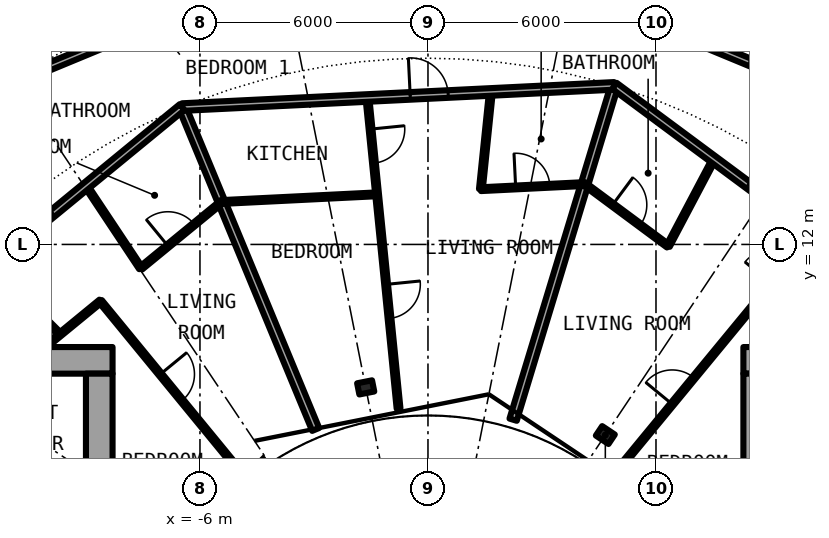
"""IFC4 building model, lengths in metres.
Left out: names, types, materials, properties, quantities, classifications, styles, units other than length and angle.
Written with IfcOpenShell. Run it as: python <this file> out.ifc"""

import sys

from ifc_helpers import new_model, si_unit, direction, frame, frame_2d, origin, origin_2d, place, context, subcontext, project, spatial, rectangle, i_section, extrude, element, fill, save


model = new_model("IFC4")
c1 = context("Model", 3, precision=1e-05, world=origin(), true_north=direction((0.0, 1.0)))
c2 = subcontext(c1, "Body", "Model", "MODEL_VIEW")
j1 = project(units=[si_unit("LENGTHUNIT", "METRE"), si_unit("PLANEANGLEUNIT", "RADIAN")], contexts=[c1])
p1 = place(None, origin())
s1 = spatial("IfcSite", under=j1, at=p1, CompositionType="ELEMENT")
p2 = place(p1, origin())
s2 = spatial("IfcBuilding", under=s1, at=p2, CompositionType="ELEMENT")
p3 = place(p2, frame((0.0, 0.0, 69.7)))
s3 = spatial("IfcBuildingStorey", under=s2, at=p3, CompositionType="ELEMENT", Elevation=69.7)
for number, where, z_axis, x_axis in (
    (1, (4.667, 6.984, 0.0), (0.0, 0.0, 1.0), (0.556, 0.831, 0.0)),
    (2, (-1.639, 8.239, 0.0), (0.0, 0.0, 1.0), (-0.195, 0.981, 0.0)),
):
    element("IfcColumn", number, at=place(p3, frame(where, z_axis=z_axis, x_axis=x_axis)), inside=s3, PredefinedType="COLUMN", context=c2, shape_type="SweptSolid", body=[
        extrude(i_section(OverallWidth=0.3, OverallDepth=0.4, WebThickness=0.013, FlangeThickness=0.024, FilletRadius=0.027, at=origin_2d()), origin(), (0.0, 0.0, 1.0), 3.05),
    ])
p4 = place(p3, frame((22.3, 8.95, 0.0), z_axis=(0.0, 0.0, 1.0), x_axis=(-1.0, 0.0, 0.0)))
e3 = element("IfcWall", 3, at=p4, inside=s3, PredefinedType="SHEAR", context=c2, shape_type="SweptSolid", body=[
    extrude(rectangle(XDim=14.0, YDim=0.7, at=frame_2d((7.0, 0.0))), origin(), (0.0, 0.0, 1.0), 3.05),
])
p5 = place(p4, frame((1.225, 0.0, 0.0)))
e4 = element("IfcOpeningElement", 4, at=p5, cuts=e3, PredefinedType="OPENING", context=c2, shape_type="SweptSolid", body=[
    extrude(rectangle(XDim=1.2, YDim=2.3, at=frame_2d((0.6, 1.15))), frame((0.0, 0.36, 0.0), z_axis=(0.0, -1.0, 0.0), x_axis=(1.0, 0.0, 0.0)), (0.0, 0.0, 1.0), 0.72),
])
p6 = place(p3, frame((8.65, -8.6, 0.0), z_axis=(0.0, 0.0, 1.0), x_axis=(0.0, 1.0, 0.0)))
e5 = element("IfcWall", 5, at=p6, inside=s3, PredefinedType="SHEAR", context=c2, shape_type="SweptSolid", body=[
    extrude(rectangle(XDim=17.2, YDim=0.7, at=frame_2d((8.6, 0.0))), origin(), (0.0, 0.0, 1.0), 3.05),
])
p7 = place(p6, frame((7.4, 0.0, 0.1)))
e6 = element("IfcOpeningElement", 6, at=p7, cuts=e5, PredefinedType="OPENING", context=c2, shape_type="SweptSolid", body=[
    extrude(rectangle(XDim=2.4, YDim=2.2, at=frame_2d((1.2, 1.1))), frame((0.0, 0.36, 0.0), z_axis=(0.0, -1.0, 0.0), x_axis=(1.0, 0.0, 0.0)), (0.0, 0.0, 1.0), 0.72),
])
p8 = place(p3, frame((-8.3, 8.95, 0.0), z_axis=(0.0, 0.0, 1.0), x_axis=(-1.0, 0.0, 0.0)))
e7 = element("IfcWall", 7, at=p8, inside=s3, PredefinedType="SHEAR", context=c2, shape_type="SweptSolid", body=[
    extrude(rectangle(XDim=14.0, YDim=0.7, at=frame_2d((7.0, 0.0))), origin(), (0.0, 0.0, 1.0), 3.05),
])
p9 = place(p8, frame((11.575, 0.0, 0.0)))
e8 = element("IfcOpeningElement", 8, at=p9, cuts=e7, PredefinedType="OPENING", context=c2, shape_type="SweptSolid", body=[
    extrude(rectangle(XDim=1.2, YDim=2.3, at=frame_2d((0.6, 1.15))), frame((0.0, 0.36, 0.0), z_axis=(0.0, -1.0, 0.0), x_axis=(1.0, 0.0, 0.0)), (0.0, 0.0, 1.0), 0.72),
])
p10 = place(p3, frame((-8.65, 8.6, 0.0), z_axis=(0.0, 0.0, 1.0), x_axis=(0.0, -1.0, 0.0)))
e9 = element("IfcWall", 9, at=p10, inside=s3, PredefinedType="SHEAR", context=c2, shape_type="SweptSolid", body=[
    extrude(rectangle(XDim=17.2, YDim=0.7, at=frame_2d((8.6, 0.0))), origin(), (0.0, 0.0, 1.0), 3.05),
])
p11 = place(p10, frame((7.4, 0.0, 0.1)))
e10 = element("IfcOpeningElement", 10, at=p11, cuts=e9, PredefinedType="OPENING", context=c2, shape_type="SweptSolid", body=[
    extrude(rectangle(XDim=2.4, YDim=2.2, at=frame_2d((1.2, 1.1))), frame((0.0, 0.36, 0.0), z_axis=(0.0, -1.0, 0.0), x_axis=(1.0, 0.0, 0.0)), (0.0, 0.0, 1.0), 0.72),
])
p12 = place(p3, frame((-11.524, 11.464, 0.0), z_axis=(0.0, 0.0, 1.0), x_axis=(0.708796844581, -0.705412668665, 0.0)))
e11 = element("IfcWall", 11, at=p12, inside=s3, PredefinedType="PARTITIONING", context=c2, shape_type="SweptSolid", body=[
    extrude(rectangle(XDim=2.597, YDim=0.1, at=frame_2d((1.299, 0.0))), origin(), (0.0, 0.0, 1.0), 2.7),
])
p13 = place(p12, frame((0.849, 0.0, 0.0)))
e12 = element("IfcOpeningElement", 12, at=p13, cuts=e11, PredefinedType="OPENING", context=c2, shape_type="SweptSolid", body=[
    extrude(rectangle(XDim=0.9, YDim=2.3, at=frame_2d((0.45, 1.15))), frame((0.0, 0.06, 0.0), z_axis=(0.0, -1.0, 0.0), x_axis=(1.0, 0.0, 0.0)), (0.0, 0.0, 1.0), 0.12),
])
p14 = place(p3, frame((-8.996, 13.539, 0.0), z_axis=(0.0, 0.0, 1.0), x_axis=(0.553615197403, -0.83277260594, 0.0)))
e13 = element("IfcWall", 13, at=p14, inside=s3, PredefinedType="PARTITIONING", context=c2, shape_type="SweptSolid", body=[
    extrude(rectangle(XDim=2.597, YDim=0.1, at=frame_2d((1.299, 0.0))), origin(), (0.0, 0.0, 1.0), 2.7),
])
p15 = place(p3, frame((-8.62, 10.504, 0.0), z_axis=(0.0, 0.0, 1.0), x_axis=(0.634358693064, -0.773038840249, 0.0)))
e14 = element("IfcWall", 14, at=p15, inside=s3, PredefinedType="PARTITIONING", context=c2, shape_type="SweptSolid", body=[
    extrude(rectangle(XDim=5.868, YDim=0.1, at=frame_2d((2.934, 0.0))), origin(), (0.0, 0.0, 1.0), 2.7),
])
p16 = place(p15, frame((2.484, 0.0, 0.0)))
e15 = element("IfcOpeningElement", 15, at=p16, cuts=e14, PredefinedType="OPENING", context=c2, shape_type="SweptSolid", body=[
    extrude(rectangle(XDim=0.9, YDim=2.3, at=frame_2d((0.45, 1.15))), frame((0.0, 0.06, 0.0), z_axis=(0.0, -1.0, 0.0), x_axis=(1.0, 0.0, 0.0)), (0.0, 0.0, 1.0), 0.12),
])
p17 = place(p3, frame((-6.468, 15.614, 0.0), z_axis=(0.0, 0.0, 1.0), x_axis=(0.382646942224, -0.923894646378, 0.0)))
e16 = element("IfcWall", 16, at=p17, inside=s3, PredefinedType="PARTITIONING", context=c2, shape_type="SweptSolid", body=[
    extrude(rectangle(XDim=9.181, YDim=0.2, at=frame_2d((4.59, 0.0))), origin(), (0.0, 0.0, 1.0), 2.7),
])
p18 = place(p3, frame((-1.593, 15.853, 0.0), z_axis=(0.0, 0.0, 1.0), x_axis=(0.099730339513, -0.995014502096, 0.0)))
e17 = element("IfcWall", 17, at=p18, inside=s3, PredefinedType="PARTITIONING", context=c2, shape_type="SweptSolid", body=[
    extrude(rectangle(XDim=8.213, YDim=0.1, at=frame_2d((4.106, 0.0))), origin(), (0.0, 0.0, 1.0), 2.7),
])
p19 = place(p18, frame((0.823, 0.0, 0.0)))
e18 = element("IfcOpeningElement", 18, at=p19, cuts=e17, PredefinedType="OPENING", context=c2, shape_type="SweptSolid", body=[
    extrude(rectangle(XDim=0.9, YDim=2.3, at=frame_2d((0.45, 1.15))), frame((0.0, 0.06, 0.0), z_axis=(0.0, -1.0, 0.0), x_axis=(1.0, 0.0, 0.0)), (0.0, 0.0, 1.0), 0.12),
])
p20 = place(p18, frame((4.929, 0.0, 0.0)))
e19 = element("IfcOpeningElement", 19, at=p20, cuts=e17, PredefinedType="OPENING", context=c2, shape_type="SweptSolid", body=[
    extrude(rectangle(XDim=0.9, YDim=2.3, at=frame_2d((0.45, 1.15))), frame((0.0, 0.06, 0.0), z_axis=(0.0, -1.0, 0.0), x_axis=(1.0, 0.0, 0.0)), (0.0, 0.0, 1.0), 0.12),
])
p21 = place(p3, frame((1.392, 13.454, 0.0), z_axis=(0.0, 0.0, 1.0), x_axis=(0.102594773028, 0.994723234145, 0.0)))
e20 = element("IfcWall", 20, at=p21, inside=s3, PredefinedType="PARTITIONING", context=c2, shape_type="SweptSolid", body=[
    extrude(rectangle(XDim=2.573, YDim=0.1, at=frame_2d((1.286, 0.0))), origin(), (0.0, 0.0, 1.0), 2.7),
])
p22 = place(p3, frame((2.241, 7.388, 0.0), z_axis=(0.0, 0.0, 1.0), x_axis=(0.290323311932, 0.956928615179, 0.0)))
e21 = element("IfcWall", 21, at=p22, inside=s3, PredefinedType="PARTITIONING", context=c2, shape_type="SweptSolid", body=[
    extrude(rectangle(XDim=9.179, YDim=0.2, at=frame_2d((4.59, 0.0))), origin(), (0.0, 0.0, 1.0), 2.7),
])
p23 = place(p3, frame((4.909, 5.958, 0.0), z_axis=(0.0, 0.0, 1.0), x_axis=(0.635976043025, 0.771708800454, 0.0)))
e22 = element("IfcWall", 22, at=p23, inside=s3, PredefinedType="PARTITIONING", context=c2, shape_type="SweptSolid", body=[
    extrude(rectangle(XDim=8.213, YDim=0.1, at=frame_2d((4.106, 0.0))), origin(), (0.0, 0.0, 1.0), 2.7),
])
p24 = place(p23, frame((6.49, 0.0, 0.0)))
e23 = element("IfcOpeningElement", 23, at=p24, cuts=e22, PredefinedType="OPENING", context=c2, shape_type="SweptSolid", body=[
    extrude(rectangle(XDim=0.9, YDim=2.3, at=frame_2d((0.45, 1.15))), frame((0.0, 0.06, 0.0), z_axis=(0.0, -1.0, 0.0), x_axis=(1.0, 0.0, 0.0)), (0.0, 0.0, 1.0), 0.12),
])
p25 = place(p23, frame((2.384, 0.0, 0.0)))
e24 = element("IfcOpeningElement", 24, at=p25, cuts=e22, PredefinedType="OPENING", context=c2, shape_type="SweptSolid", body=[
    extrude(rectangle(XDim=0.9, YDim=2.3, at=frame_2d((0.45, 1.15))), frame((0.0, 0.06, 0.0), z_axis=(0.0, -1.0, 0.0), x_axis=(1.0, 0.0, 0.0)), (0.0, 0.0, 1.0), 0.12),
])
p26 = place(p3, frame((6.318, 11.96, 0.0), z_axis=(0.0, 0.0, 1.0), x_axis=(0.467001992543, 0.884256263173, 0.0)))
e25 = element("IfcWall", 25, at=p26, inside=s3, PredefinedType="PARTITIONING", context=c2, shape_type="SweptSolid", body=[
    extrude(rectangle(XDim=2.572, YDim=0.1, at=frame_2d((1.286, 0.0))), origin(), (0.0, 0.0, 1.0), 2.7),
])
p27 = place(p3, frame((-5.439, 13.116, 0.0), z_axis=(0.0, 0.0, 1.0), x_axis=(0.998772010578, 0.049542616872, 0.0)))
e26 = element("IfcWall", 26, at=p27, inside=s3, PredefinedType="PARTITIONING", context=c2, shape_type="SweptSolid", body=[
    extrude(rectangle(XDim=4.1, YDim=0.1, at=frame_2d((2.05, 0.0))), origin(), (0.0, 0.0, 1.0), 2.7),
])
p28 = place(p3, frame((1.392, 13.454, 0.0), z_axis=(0.0, 0.0, 1.0), x_axis=(0.998779365748, 0.049394114582, 0.0)))
e27 = element("IfcWall", 27, at=p28, inside=s3, PredefinedType="PARTITIONING", context=c2, shape_type="SweptSolid", body=[
    extrude(rectangle(XDim=2.733, YDim=0.1, at=frame_2d((1.367, 0.0))), origin(), (0.0, 0.0, 1.0), 2.7),
])
p29 = place(p28, frame((0.917, 0.0, 0.0)))
e28 = element("IfcOpeningElement", 28, at=p29, cuts=e27, PredefinedType="OPENING", context=c2, shape_type="SweptSolid", body=[
    extrude(rectangle(XDim=0.9, YDim=2.3, at=frame_2d((0.45, 1.15))), frame((0.0, 0.06, 0.0), z_axis=(0.0, -1.0, 0.0), x_axis=(1.0, 0.0, 0.0)), (0.0, 0.0, 1.0), 0.12),
])
p30 = place(p3, frame((4.122, 13.589, 0.0), z_axis=(0.0, 0.0, 1.0), x_axis=(0.803128348509, -0.595806055542, 0.0)))
e29 = element("IfcWall", 29, at=p30, inside=s3, PredefinedType="PARTITIONING", context=c2, shape_type="SweptSolid", body=[
    extrude(rectangle(XDim=2.734, YDim=0.1, at=frame_2d((1.367, 0.0))), origin(), (0.0, 0.0, 1.0), 2.7),
])
p31 = place(p30, frame((0.917, 0.0, 0.0)))
e30 = element("IfcOpeningElement", 30, at=p31, cuts=e29, PredefinedType="OPENING", context=c2, shape_type="SweptSolid", body=[
    extrude(rectangle(XDim=0.9, YDim=2.3, at=frame_2d((0.45, 1.15))), frame((0.0, 0.06, 0.0), z_axis=(0.0, -1.0, 0.0), x_axis=(1.0, 0.0, 0.0)), (0.0, 0.0, 1.0), 0.12),
])
p32 = place(p3, frame((-10.087, 9.3, 0.0), z_axis=(0.0, 0.0, 1.0), x_axis=(0.772957368531, 0.6344579627, 0.0)))
e31 = element("IfcWall", 31, at=p32, inside=s3, PredefinedType="PARTITIONING", context=c2, shape_type="SweptSolid", body=[
    extrude(rectangle(XDim=1.906, YDim=0.1, at=frame_2d((0.953, 0.0))), origin(), (0.0, 0.0, 1.0), 2.7),
])
p33 = place(p3, frame((-7.552, 11.379, 0.0), z_axis=(0.0, 0.0, 1.0), x_axis=(0.773323547924, 0.634011585246, 0.0)))
e32 = element("IfcWall", 32, at=p33, inside=s3, PredefinedType="PARTITIONING", context=c2, shape_type="SweptSolid", body=[
    extrude(rectangle(XDim=2.748, YDim=0.1, at=frame_2d((1.374, 0.0))), origin(), (0.0, 0.0, 1.0), 2.7),
])
p34 = place(p33, frame((0.917, 0.0, 0.0)))
e33 = element("IfcOpeningElement", 33, at=p34, cuts=e32, PredefinedType="OPENING", context=c2, shape_type="SweptSolid", body=[
    extrude(rectangle(XDim=0.9, YDim=2.3, at=frame_2d((0.45, 1.15))), frame((0.0, 0.06, 0.0), z_axis=(0.0, -1.0, 0.0), x_axis=(1.0, 0.0, 0.0)), (0.0, 0.0, 1.0), 0.12),
])
p35 = place(p3, frame((-6.468, 15.614, 0.0), z_axis=(0.0, 0.0, 1.0), x_axis=(0.998797695979, 0.049022061427, 0.0)))
e34 = element("IfcWall", 34, at=p35, inside=s3, PredefinedType="PARTITIONING", context=c2, shape_type="SweptSolid", body=[
    extrude(rectangle(XDim=11.385, YDim=0.2, at=frame_2d((5.692, 0.0))), origin(), (0.0, 0.0, 1.0), 2.7),
])
p36 = place(p35, frame((6.008, 0.0, 0.0)))
e35 = element("IfcOpeningElement", 35, at=p36, cuts=e34, PredefinedType="OPENING", context=c2, shape_type="SweptSolid", body=[
    extrude(rectangle(XDim=1.0, YDim=2.3, at=frame_2d((0.5, 1.15))), frame((0.0, 0.11, 0.0), z_axis=(0.0, -1.0, 0.0), x_axis=(1.0, 0.0, 0.0)), (0.0, 0.0, 1.0), 0.22),
])
p37 = place(p3, frame((4.906, 16.172, 0.0), z_axis=(0.0, 0.0, 1.0), x_axis=(0.803204584823, -0.59570327758, 0.0)))
e36 = element("IfcWall", 36, at=p37, inside=s3, PredefinedType="PARTITIONING", context=c2, shape_type="SweptSolid", body=[
    extrude(rectangle(XDim=11.387, YDim=0.2, at=frame_2d((5.693, 0.0))), origin(), (0.0, 0.0, 1.0), 2.7),
])
p38 = place(p37, frame((4.38, 0.0, 0.0)))
e37 = element("IfcOpeningElement", 37, at=p38, cuts=e36, PredefinedType="OPENING", context=c2, shape_type="SweptSolid", body=[
    extrude(rectangle(XDim=1.0, YDim=2.3, at=frame_2d((0.5, 1.15))), frame((0.0, 0.11, 0.0), z_axis=(0.0, -1.0, 0.0), x_axis=(1.0, 0.0, 0.0)), (0.0, 0.0, 1.0), 0.22),
])
p39 = place(p3, frame((-14.052, 9.389, 0.0), z_axis=(0.0, 0.0, 1.0), x_axis=(0.77292501819, 0.634497372931, 0.0)))
e38 = element("IfcWall", 38, at=p39, inside=s3, PredefinedType="PARTITIONING", context=c2, shape_type="SweptSolid", body=[
    extrude(rectangle(XDim=9.81, YDim=0.2, at=frame_2d((4.905, 0.0))), origin(), (0.0, 0.0, 1.0), 2.7),
])
p40 = place(p39, frame((4.406, 0.0, 0.0)))
e39 = element("IfcOpeningElement", 39, at=p40, cuts=e38, PredefinedType="OPENING", context=c2, shape_type="SweptSolid", body=[
    extrude(rectangle(XDim=1.0, YDim=2.3, at=frame_2d((0.5, 1.15))), frame((0.0, 0.11, 0.0), z_axis=(0.0, -1.0, 0.0), x_axis=(1.0, 0.0, 0.0)), (0.0, 0.0, 1.0), 0.22),
])
p41 = place(p3, frame((1.921, 19.506, 0.0), z_axis=(0.0, 0.0, 1.0), x_axis=(0.923845560554, -0.38276543763, 0.0)))
e40 = element("IfcWall", 40, at=p41, inside=s3, PredefinedType="PARTITIONING", context=c2, shape_type="SweptSolid", body=[
    extrude(rectangle(XDim=11.381, YDim=0.2, at=frame_2d((5.69, 0.0))), origin(), (0.0, 0.0, 1.0), 2.7),
])
p42 = place(p41, frame((7.087, 0.0, 0.0)))
e41 = element("IfcOpeningElement", 41, at=p42, cuts=e40, PredefinedType="OPENING", context=c2, shape_type="SweptSolid", body=[
    extrude(rectangle(XDim=1.0, YDim=2.3, at=frame_2d((0.5, 1.15))), frame((0.0, 0.11, 0.0), z_axis=(0.0, -1.0, 0.0), x_axis=(1.0, 0.0, 0.0)), (0.0, 0.0, 1.0), 0.22),
])
p43 = place(p3, frame((-10.745, 16.357, 0.0), z_axis=(0.0, 0.0, 1.0), x_axis=(0.923928411035, 0.382565407848, 0.0)))
e42 = element("IfcWall", 42, at=p43, inside=s3, PredefinedType="PARTITIONING", context=c2, shape_type="SweptSolid", body=[
    extrude(rectangle(XDim=7.335, YDim=0.2, at=frame_2d((3.667, 0.0))), origin(), (0.0, 0.0, 1.0), 2.38),
])
p44 = place(p43, frame((2.212, 0.0, 0.0)))
e43 = element("IfcOpeningElement", 43, at=p44, cuts=e42, PredefinedType="OPENING", context=c2, shape_type="SweptSolid", body=[
    extrude(rectangle(XDim=1.0, YDim=2.3, at=frame_2d((0.5, 1.15))), frame((0.0, 0.11, 0.0), z_axis=(0.0, -1.0, 0.0), x_axis=(1.0, 0.0, 0.0)), (0.0, 0.0, 1.0), 0.22),
])
p45 = place(p38, origin())
e44 = element("IfcDoor", 44, at=p45, inside=s3, OperationType="SINGLE_SWING_LEFT", PredefinedType="DOOR", context=c2, shape_type="SweptSolid", body=[
    extrude(rectangle(XDim=1.0, YDim=2.3, at=frame_2d((0.5, 1.15))), frame((0.0, 0.025, 0.0), z_axis=(0.0, -1.0, 0.0), x_axis=(1.0, 0.0, 0.0)), (0.0, 0.0, 1.0), 0.05),
])
fill(e37, e44)
p46 = place(p31, origin())
e45 = element("IfcDoor", 45, at=p46, inside=s3, OperationType="SINGLE_SWING_LEFT", PredefinedType="DOOR", context=c2, shape_type="SweptSolid", body=[
    extrude(rectangle(XDim=0.9, YDim=2.3, at=frame_2d((0.45, 1.15))), frame((0.0, 0.025, 0.0), z_axis=(0.0, -1.0, 0.0), x_axis=(1.0, 0.0, 0.0)), (0.0, 0.0, 1.0), 0.05),
])
fill(e30, e45)
p47 = place(p25, origin())
e46 = element("IfcDoor", 46, at=p47, inside=s3, OperationType="SINGLE_SWING_LEFT", PredefinedType="DOOR", context=c2, shape_type="SweptSolid", body=[
    extrude(rectangle(XDim=0.9, YDim=2.3, at=frame_2d((0.45, 1.15))), frame((0.0, 0.025, 0.0), z_axis=(0.0, -1.0, 0.0), x_axis=(1.0, 0.0, 0.0)), (0.0, 0.0, 1.0), 0.05),
])
fill(e24, e46)
p48 = place(p36, origin())
e47 = element("IfcDoor", 47, at=p48, inside=s3, OperationType="SINGLE_SWING_RIGHT", PredefinedType="DOOR", context=c2, shape_type="SweptSolid", body=[
    extrude(rectangle(XDim=1.0, YDim=2.3, at=frame_2d((0.5, 1.15))), frame((0.0, 0.025, 0.0), z_axis=(0.0, -1.0, 0.0), x_axis=(1.0, 0.0, 0.0)), (0.0, 0.0, 1.0), 0.05),
])
fill(e35, e47)
p49 = place(p29, origin())
e48 = element("IfcDoor", 48, at=p49, inside=s3, OperationType="SINGLE_SWING_RIGHT", PredefinedType="DOOR", context=c2, shape_type="SweptSolid", body=[
    extrude(rectangle(XDim=0.9, YDim=2.3, at=frame_2d((0.45, 1.15))), frame((0.0, 0.025, 0.0), z_axis=(0.0, -1.0, 0.0), x_axis=(1.0, 0.0, 0.0)), (0.0, 0.0, 1.0), 0.05),
])
fill(e28, e48)
p50 = place(p19, origin())
e49 = element("IfcDoor", 49, at=p50, inside=s3, OperationType="SINGLE_SWING_LEFT", PredefinedType="DOOR", context=c2, shape_type="SweptSolid", body=[
    extrude(rectangle(XDim=0.9, YDim=2.3, at=frame_2d((0.45, 1.15))), frame((0.0, 0.025, 0.0), z_axis=(0.0, -1.0, 0.0), x_axis=(1.0, 0.0, 0.0)), (0.0, 0.0, 1.0), 0.05),
])
fill(e18, e49)
p51 = place(p20, origin())
e50 = element("IfcDoor", 50, at=p51, inside=s3, OperationType="SINGLE_SWING_RIGHT", PredefinedType="DOOR", context=c2, shape_type="SweptSolid", body=[
    extrude(rectangle(XDim=0.9, YDim=2.3, at=frame_2d((0.45, 1.15))), frame((0.0, 0.025, 0.0), z_axis=(0.0, -1.0, 0.0), x_axis=(1.0, 0.0, 0.0)), (0.0, 0.0, 1.0), 0.05),
])
fill(e19, e50)
p52 = place(p40, origin())
e51 = element("IfcDoor", 51, at=p52, inside=s3, OperationType="SINGLE_SWING_RIGHT", PredefinedType="DOOR", context=c2, shape_type="SweptSolid", body=[
    extrude(rectangle(XDim=1.0, YDim=2.3, at=frame_2d((0.5, 1.15))), frame((0.0, 0.025, 0.0), z_axis=(0.0, -1.0, 0.0), x_axis=(1.0, 0.0, 0.0)), (0.0, 0.0, 1.0), 0.05),
])
fill(e39, e51)
p53 = place(p34, origin())
e52 = element("IfcDoor", 52, at=p53, inside=s3, OperationType="SINGLE_SWING_LEFT", PredefinedType="DOOR", context=c2, shape_type="SweptSolid", body=[
    extrude(rectangle(XDim=0.9, YDim=2.3, at=frame_2d((0.45, 1.15))), frame((0.0, 0.025, 0.0), z_axis=(0.0, -1.0, 0.0), x_axis=(1.0, 0.0, 0.0)), (0.0, 0.0, 1.0), 0.05),
])
fill(e33, e52)
p54 = place(p16, origin())
e53 = element("IfcDoor", 53, at=p54, inside=s3, OperationType="SINGLE_SWING_RIGHT", PredefinedType="DOOR", context=c2, shape_type="SweptSolid", body=[
    extrude(rectangle(XDim=0.9, YDim=2.3, at=frame_2d((0.45, 1.15))), frame((0.0, 0.025, 0.0), z_axis=(0.0, -1.0, 0.0), x_axis=(1.0, 0.0, 0.0)), (0.0, 0.0, 1.0), 0.05),
])
fill(e15, e53)
save(model, sys.argv[1])
